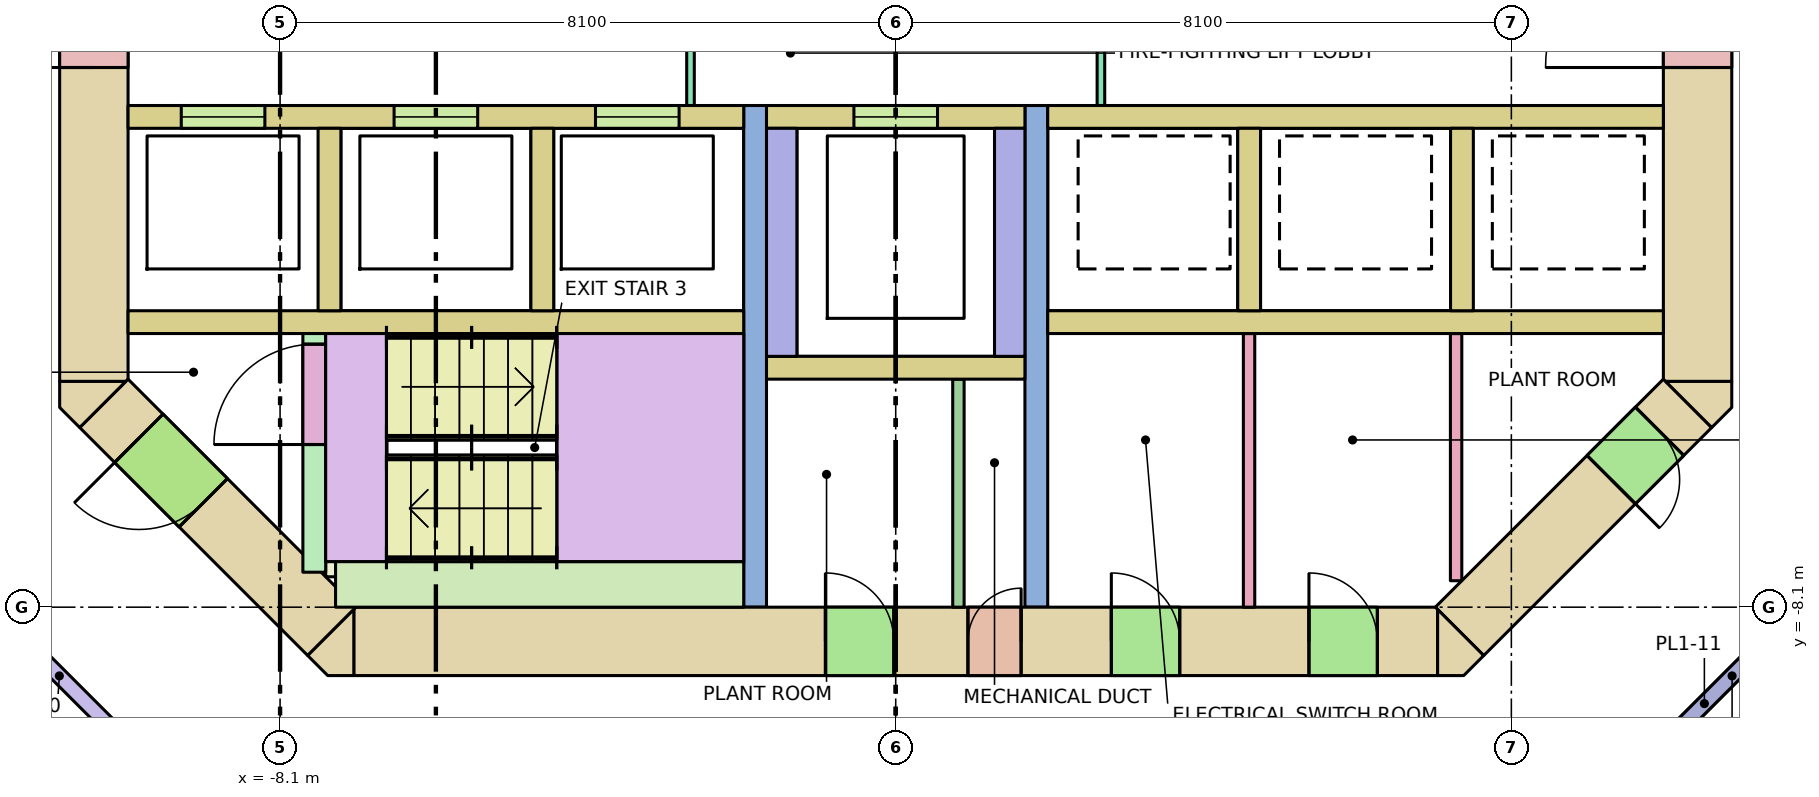
"""IFC4 building model, lengths in metres.
Left out: names, types, materials, properties, quantities, classifications, styles, units other than length and angle.
Written with IfcOpenShell. Run it as: python <this file> out.ifc"""

import sys

from ifc_helpers import new_model, si_unit, direction, frame, frame_2d, origin, place, context, subcontext, project, spatial, polyline, rectangle, outline, extrude, element, fill, save


model = new_model("IFC4")
c1 = context("Model", 3, precision=1e-05, world=origin(), true_north=direction((0.0, 1.0)))
c2 = subcontext(c1, "Body", "Model", "MODEL_VIEW")
j1 = project(units=[si_unit("LENGTHUNIT", "METRE"), si_unit("PLANEANGLEUNIT", "RADIAN")], contexts=[c1])
p1 = place(None, origin())
s1 = spatial("IfcSite", under=j1, at=p1, CompositionType="ELEMENT")
p2 = place(p1, origin())
s2 = spatial("IfcBuilding", under=s1, at=p2, CompositionType="ELEMENT")
p3 = place(p2, frame((0.0, 0.0, 110.6)))
s3 = spatial("IfcBuildingStorey", under=s2, at=p3, CompositionType="ELEMENT", Elevation=110.6)
p4 = place(p3, frame((-7.13, -8.55, -0.28), z_axis=(0.0, 0.0, 1.0), x_axis=(1.0, 0.0, 0.0)))
e1 = element("IfcWall", 1, at=p4, inside=s3, PredefinedType="SHEAR", context=c2, shape_type="SweptSolid", body=[
    extrude(rectangle(XDim=14.26, YDim=0.9, at=frame_2d((7.13, 0.0))), origin(), (0.0, 0.0, 1.0), 5.6),
])
p5 = place(p4, frame((8.08, 0.0, 0.28)))
e2 = element("IfcOpeningElement", 2, at=p5, cuts=e1, PredefinedType="OPENING", context=c2, shape_type="SweptSolid", body=[
    extrude(rectangle(XDim=0.7, YDim=2.1, at=frame_2d((0.35, 1.05))), frame((0.0, 0.46, 0.0), z_axis=(0.0, -1.0, 0.0), x_axis=(1.0, 0.0, 0.0)), (0.0, 0.0, 1.0), 0.92),
])
p6 = place(p4, frame((6.205, 0.0, 0.28)))
e3 = element("IfcOpeningElement", 3, at=p6, cuts=e1, PredefinedType="OPENING", context=c2, shape_type="SweptSolid", body=[
    extrude(rectangle(XDim=0.9, YDim=2.1, at=frame_2d((0.45, 1.05))), frame((0.0, 0.46, 0.0), z_axis=(0.0, -1.0, 0.0), x_axis=(1.0, 0.0, 0.0)), (0.0, 0.0, 1.0), 0.92),
])
p7 = place(p4, frame((9.967, 0.0, 0.28)))
e4 = element("IfcOpeningElement", 4, at=p7, cuts=e1, PredefinedType="OPENING", context=c2, shape_type="SweptSolid", body=[
    extrude(rectangle(XDim=0.9, YDim=2.1, at=frame_2d((0.45, 1.05))), frame((0.0, 0.46, 0.0), z_axis=(0.0, -1.0, 0.0), x_axis=(1.0, 0.0, 0.0)), (0.0, 0.0, 1.0), 0.92),
])
p8 = place(p4, frame((12.567, 0.0, 0.28)))
e5 = element("IfcOpeningElement", 5, at=p8, cuts=e1, PredefinedType="OPENING", context=c2, shape_type="SweptSolid", body=[
    extrude(rectangle(XDim=0.9, YDim=2.1, at=frame_2d((0.45, 1.05))), frame((0.0, 0.46, 0.0), z_axis=(0.0, -1.0, 0.0), x_axis=(1.0, 0.0, 0.0)), (0.0, 0.0, 1.0), 0.92),
])
p9 = place(p3, frame((-10.55, -5.13, -0.28), z_axis=(0.0, 0.0, 1.0), x_axis=(0.0, 1.0, 0.0)))
e6 = element("IfcWall", 6, at=p9, inside=s3, PredefinedType="SHEAR", context=c2, shape_type="SweptSolid", body=[
    extrude(rectangle(XDim=10.26, YDim=0.9, at=frame_2d((5.13, 0.0))), origin(), (0.0, 0.0, 1.0), 5.6),
])
p10 = place(p9, frame((4.13, 0.0, 0.28)))
e7 = element("IfcOpeningElement", 7, at=p10, cuts=e6, PredefinedType="OPENING", context=c2, shape_type="SweptSolid", body=[
    extrude(rectangle(XDim=2.0, YDim=2.1, at=frame_2d((1.0, 1.05))), frame((0.0, 0.46, 0.0), z_axis=(0.0, -1.0, 0.0), x_axis=(1.0, 0.0, 0.0)), (0.0, 0.0, 1.0), 0.92),
])
p11 = place(p3, frame((10.55, -5.13, -0.28), z_axis=(0.0, 0.0, 1.0), x_axis=(0.0, 1.0, 0.0)))
e8 = element("IfcWall", 8, at=p11, inside=s3, PredefinedType="SHEAR", context=c2, shape_type="SweptSolid", body=[
    extrude(rectangle(XDim=10.26, YDim=0.9, at=frame_2d((5.13, 0.0))), origin(), (0.0, 0.0, 1.0), 5.6),
])
p12 = place(p11, frame((4.13, 0.0, 0.28)))
e9 = element("IfcOpeningElement", 9, at=p12, cuts=e8, PredefinedType="OPENING", context=c2, shape_type="SweptSolid", body=[
    extrude(rectangle(XDim=2.0, YDim=2.1, at=frame_2d((1.0, 1.05))), frame((0.0, 0.46, 0.0), z_axis=(0.0, -1.0, 0.0), x_axis=(1.0, 0.0, 0.0)), (0.0, 0.0, 1.0), 0.92),
])
p13 = place(p3, frame((10.418, -5.418, -0.28), z_axis=(0.0, 0.0, 1.0), x_axis=(-0.707106781187, -0.707106781187, 0.0)))
e10 = element("IfcWall", 10, at=p13, inside=s3, PredefinedType="SHEAR", context=c2, shape_type="SweptSolid", body=[
    extrude(rectangle(XDim=4.243, YDim=0.9, at=frame_2d((2.121, 0.0))), origin(), (0.0, 0.0, 1.0), 5.6),
])
p14 = place(p13, frame((0.52, 0.0, 0.28)))
e11 = element("IfcOpeningElement", 11, at=p14, cuts=e10, PredefinedType="OPENING", context=c2, shape_type="SweptSolid", body=[
    extrude(rectangle(XDim=0.9, YDim=2.1, at=frame_2d((0.45, 1.05))), frame((0.0, 0.46, 0.0), z_axis=(0.0, -1.0, 0.0), x_axis=(1.0, 0.0, 0.0)), (0.0, 0.0, 1.0), 0.92),
])
p15 = place(p3, frame((-7.418, -8.418, -0.28), z_axis=(0.0, 0.0, 1.0), x_axis=(-0.707106781187, 0.707106781187, 0.0)))
e12 = element("IfcWall", 12, at=p15, inside=s3, PredefinedType="SHEAR", context=c2, shape_type="SweptSolid", body=[
    extrude(rectangle(XDim=4.243, YDim=0.9, at=frame_2d((2.121, 0.0))), origin(), (0.0, 0.0, 1.0), 5.6),
])
p16 = place(p15, frame((2.393, 0.0, 0.28)))
e13 = element("IfcOpeningElement", 13, at=p16, cuts=e12, PredefinedType="OPENING", context=c2, shape_type="SweptSolid", body=[
    extrude(rectangle(XDim=1.2, YDim=2.1, at=frame_2d((0.6, 1.05))), frame((0.0, 0.46, 0.0), z_axis=(0.0, -1.0, 0.0), x_axis=(1.0, 0.0, 0.0)), (0.0, 0.0, 1.0), 0.92),
])
p17 = place(p3, frame((0.0, 0.0, -0.28)))
e14 = element("IfcWall", 14, at=p17, inside=s3, PredefinedType="SHEAR", context=c2, shape_type="SweptSolid", body=[
    extrude(outline(polyline([(-7.473, -9.0), (-7.736, -8.736), (-7.13, -8.13), (-7.13, -9.0), (-7.473, -9.0)])), origin(), (0.0, 0.0, 1.0), 5.6),
])
p18 = place(p3, frame((0.0, 0.0, -0.28)))
e15 = element("IfcWall", 15, at=p18, inside=s3, PredefinedType="SHEAR", context=c2, shape_type="SweptSolid", body=[
    extrude(outline(polyline([(7.473, -9.0), (7.13, -9.0), (7.13, -8.13), (7.736, -8.736), (7.473, -9.0)])), origin(), (0.0, 0.0, 1.0), 5.6),
])
p19 = place(p3, frame((0.0, 0.0, -0.28)))
e16 = element("IfcWall", 16, at=p19, inside=s3, PredefinedType="SHEAR", context=c2, shape_type="SweptSolid", body=[
    extrude(outline(polyline([(-11.0, -5.473), (-11.0, -5.13), (-10.13, -5.13), (-10.736, -5.736), (-11.0, -5.473)])), origin(), (0.0, 0.0, 1.0), 5.6),
])
p20 = place(p3, frame((0.0, 0.0, -0.28)))
e17 = element("IfcWall", 17, at=p20, inside=s3, PredefinedType="SHEAR", context=c2, shape_type="SweptSolid", body=[
    extrude(outline(polyline([(11.0, -5.473), (10.736, -5.736), (10.13, -5.13), (11.0, -5.13), (11.0, -5.473)])), origin(), (0.0, 0.0, 1.0), 5.6),
])
for number, where, z_axis, x_axis in (
    (18, (-10.1, -4.35, 0.0), (0.0, 0.0, 1.0), (1.0, 0.0, 0.0)),
    (19, (2.0, -4.35, 0.0), (0.0, 0.0, 1.0), (1.0, 0.0, 0.0)),
):
    element("IfcWall", number, at=place(p3, frame(where, z_axis=z_axis, x_axis=x_axis)), inside=s3, PredefinedType="SOLIDWALL", context=c2, shape_type="SweptSolid", body=[
        extrude(rectangle(XDim=8.1, YDim=0.3, at=frame_2d((4.05, 0.0))), origin(), (0.0, 0.0, 1.0), 5.32),
    ])
p21 = place(p3, frame((-10.1, -1.65, 0.0), z_axis=(0.0, 0.0, 1.0), x_axis=(1.0, 0.0, 0.0)))
e20 = element("IfcWall", 20, at=p21, inside=s3, PredefinedType="SOLIDWALL", context=c2, shape_type="SweptSolid", body=[
    extrude(rectangle(XDim=8.1, YDim=0.3, at=frame_2d((4.05, 0.0))), origin(), (0.0, 0.0, 1.0), 5.32),
])
p22 = place(p21, frame((0.7, 0.0, 0.0)))
e21 = element("IfcOpeningElement", 21, at=p22, cuts=e20, PredefinedType="OPENING", context=c2, shape_type="SweptSolid", body=[
    extrude(rectangle(XDim=1.1, YDim=2.1, at=frame_2d((0.55, 1.05))), frame((0.0, 0.16, 0.0), z_axis=(0.0, -1.0, 0.0), x_axis=(1.0, 0.0, 0.0)), (0.0, 0.0, 1.0), 0.32),
])
p23 = place(p21, frame((3.5, 0.0, 0.0)))
e22 = element("IfcOpeningElement", 22, at=p23, cuts=e20, PredefinedType="OPENING", context=c2, shape_type="SweptSolid", body=[
    extrude(rectangle(XDim=1.1, YDim=2.1, at=frame_2d((0.55, 1.05))), frame((0.0, 0.16, 0.0), z_axis=(0.0, -1.0, 0.0), x_axis=(1.0, 0.0, 0.0)), (0.0, 0.0, 1.0), 0.32),
])
p24 = place(p21, frame((6.15, 0.0, 0.0)))
e23 = element("IfcOpeningElement", 23, at=p24, cuts=e20, PredefinedType="OPENING", context=c2, shape_type="SweptSolid", body=[
    extrude(rectangle(XDim=1.1, YDim=2.1, at=frame_2d((0.55, 1.05))), frame((0.0, 0.16, 0.0), z_axis=(0.0, -1.0, 0.0), x_axis=(1.0, 0.0, 0.0)), (0.0, 0.0, 1.0), 0.32),
])
p25 = place(p3, frame((2.0, -1.65, 0.0), z_axis=(0.0, 0.0, 1.0), x_axis=(1.0, 0.0, 0.0)))
e24 = element("IfcWall", 24, at=p25, inside=s3, PredefinedType="SOLIDWALL", context=c2, shape_type="SweptSolid", body=[
    extrude(rectangle(XDim=8.1, YDim=0.3, at=frame_2d((4.05, 0.0))), origin(), (0.0, 0.0, 1.0), 5.32),
])
for number, where, z_axis, x_axis in (
    (25, (-7.45, -4.2, 0.0), (0.0, 0.0, 1.0), (0.0, 1.0, 0.0)),
    (26, (-4.65, -4.2, 0.0), (0.0, 0.0, 1.0), (0.0, 1.0, 0.0)),
    (27, (4.65, -4.2, 0.0), (0.0, 0.0, 1.0), (0.0, 1.0, 0.0)),
    (28, (7.45, -4.2, 0.0), (0.0, 0.0, 1.0), (0.0, 1.0, 0.0)),
):
    element("IfcWall", number, at=place(p3, frame(where, z_axis=z_axis, x_axis=x_axis)), inside=s3, PredefinedType="SOLIDWALL", context=c2, shape_type="SweptSolid", body=[
        extrude(rectangle(XDim=2.4, YDim=0.3, at=frame_2d((1.2, 0.0))), origin(), (0.0, 0.0, 1.0), 5.32),
    ])
for number, where, z_axis, x_axis in (
    (29, (-1.85, -8.1, 0.0), (0.0, 0.0, 1.0), (0.0, 1.0, 0.0)),
    (30, (1.85, -8.1, 0.0), (0.0, 0.0, 1.0), (0.0, 1.0, 0.0)),
):
    element("IfcWall", number, at=place(p3, frame(where, z_axis=z_axis, x_axis=x_axis)), inside=s3, PredefinedType="SHEAR", context=c2, shape_type="SweptSolid", body=[
        extrude(rectangle(XDim=6.6, YDim=0.3, at=frame_2d((3.3, 0.0))), origin(), (0.0, 0.0, 1.0), 5.32),
    ])
p26 = place(p3, frame((-1.7, -1.65, 0.0), z_axis=(0.0, 0.0, 1.0), x_axis=(1.0, 0.0, 0.0)))
e31 = element("IfcWall", 31, at=p26, inside=s3, PredefinedType="SOLIDWALL", context=c2, shape_type="SweptSolid", body=[
    extrude(rectangle(XDim=3.4, YDim=0.3, at=frame_2d((1.7, 0.0))), origin(), (0.0, 0.0, 1.0), 5.32),
])
p27 = place(p26, frame((1.15, 0.0, 0.0)))
e32 = element("IfcOpeningElement", 32, at=p27, cuts=e31, PredefinedType="OPENING", context=c2, shape_type="SweptSolid", body=[
    extrude(rectangle(XDim=1.1, YDim=2.1, at=frame_2d((0.55, 1.05))), frame((0.0, 0.16, 0.0), z_axis=(0.0, -1.0, 0.0), x_axis=(1.0, 0.0, 0.0)), (0.0, 0.0, 1.0), 0.32),
])
for number, where, z_axis, x_axis in (
    (33, (-1.5, -4.8, 0.0), (0.0, 0.0, 1.0), (0.0, 1.0, 0.0)),
    (34, (1.5, -4.8, 0.0), (0.0, 0.0, 1.0), (0.0, 1.0, 0.0)),
):
    element("IfcWall", number, at=place(p3, frame(where, z_axis=z_axis, x_axis=x_axis)), inside=s3, PredefinedType="SOLIDWALL", context=c2, shape_type="SweptSolid", body=[
        extrude(rectangle(XDim=3.0, YDim=0.4, at=frame_2d((1.5, 0.0))), origin(), (0.0, 0.0, 1.0), 5.32),
    ])
p28 = place(p3, frame((-1.7, -4.95, 0.0), z_axis=(0.0, 0.0, 1.0), x_axis=(1.0, 0.0, 0.0)))
e35 = element("IfcWall", 35, at=p28, inside=s3, PredefinedType="SOLIDWALL", context=c2, shape_type="SweptSolid", body=[
    extrude(rectangle(XDim=3.4, YDim=0.3, at=frame_2d((1.7, 0.0))), origin(), (0.0, 0.0, 1.0), 5.32),
])
p29 = place(p3, frame((-7.65, -7.64, 0.0), z_axis=(0.0, 0.0, 1.0), x_axis=(0.0, 1.0, 0.0)))
e36 = element("IfcWall", 36, at=p29, inside=s3, PredefinedType="SHEAR", context=c2, shape_type="SweptSolid", body=[
    extrude(rectangle(XDim=3.14, YDim=0.3, at=frame_2d((1.57, 0.0))), origin(), (0.0, 0.0, 1.0), 5.32),
])
p30 = place(p29, frame((1.68, 0.0, 0.0)))
e37 = element("IfcOpeningElement", 37, at=p30, cuts=e36, PredefinedType="OPENING", context=c2, shape_type="SweptSolid", body=[
    extrude(rectangle(XDim=1.32, YDim=2.1, at=frame_2d((0.66, 1.05))), frame((0.0, 0.16, 0.0), z_axis=(0.0, -1.0, 0.0), x_axis=(1.0, 0.0, 0.0)), (0.0, 0.0, 1.0), 0.32),
])
p31 = place(p3, frame((-7.5, -7.6, 0.0), z_axis=(0.0, 0.0, 1.0), x_axis=(1.0, 0.0, 0.0)))
e38 = element("IfcWall", 38, at=p31, inside=s3, PredefinedType="SHEAR", context=c2, shape_type="SweptSolid", body=[
    extrude(rectangle(XDim=0.6, YDim=0.2, at=frame_2d((0.3, 0.0))), origin(), (0.0, 0.0, 1.0), 5.32),
])
p32 = place(p3, frame((-7.37, -7.8, 0.0), z_axis=(0.0, 0.0, 1.0), x_axis=(1.0, 0.0, 0.0)))
e39 = element("IfcWall", 39, at=p32, inside=s3, PredefinedType="SHEAR", context=c2, shape_type="SweptSolid", body=[
    extrude(rectangle(XDim=5.37, YDim=0.6, at=frame_2d((2.685, 0.0))), origin(), (0.0, 0.0, 1.0), 5.32),
])
p33 = place(p3, frame((-2.7, -1.5, 0.0), z_axis=(0.0, 0.0, 1.0), x_axis=(0.0, 1.0, 0.0)))
e40 = element("IfcWall", 40, at=p33, inside=s3, PredefinedType="PARTITIONING", context=c2, shape_type="SweptSolid", body=[
    extrude(rectangle(XDim=3.0, YDim=0.1, at=frame_2d((1.5, 0.0))), origin(), (0.0, 0.0, 1.0), 5.32),
])
p34 = place(p33, frame((0.9, 0.0, 0.0)))
e41 = element("IfcOpeningElement", 41, at=p34, cuts=e40, PredefinedType="OPENING", context=c2, shape_type="SweptSolid", body=[
    extrude(rectangle(XDim=1.2, YDim=2.1, at=frame_2d((0.6, 1.05))), frame((0.0, 0.06, 0.0), z_axis=(0.0, -1.0, 0.0), x_axis=(1.0, 0.0, 0.0)), (0.0, 0.0, 1.0), 0.12),
])
p35 = place(p3, frame((2.7, -1.5, 0.0), z_axis=(0.0, 0.0, 1.0), x_axis=(0.0, 1.0, 0.0)))
e42 = element("IfcWall", 42, at=p35, inside=s3, PredefinedType="PARTITIONING", context=c2, shape_type="SweptSolid", body=[
    extrude(rectangle(XDim=3.0, YDim=0.1, at=frame_2d((1.5, 0.0))), origin(), (0.0, 0.0, 1.0), 5.32),
])
p36 = place(p35, frame((0.9, 0.0, 0.0)))
e43 = element("IfcOpeningElement", 43, at=p36, cuts=e42, PredefinedType="OPENING", context=c2, shape_type="SweptSolid", body=[
    extrude(rectangle(XDim=1.2, YDim=2.1, at=frame_2d((0.6, 1.05))), frame((0.0, 0.06, 0.0), z_axis=(0.0, -1.0, 0.0), x_axis=(1.0, 0.0, 0.0)), (0.0, 0.0, 1.0), 0.12),
])
p37 = place(p3, frame((0.825, -8.1, 0.0), z_axis=(0.0, 0.0, 1.0), x_axis=(0.0, 1.0, 0.0)))
e44 = element("IfcWall", 44, at=p37, inside=s3, PredefinedType="PARTITIONING", context=c2, shape_type="SweptSolid", body=[
    extrude(rectangle(XDim=3.0, YDim=0.15, at=frame_2d((1.5, 0.0))), origin(), (0.0, 0.0, 1.0), 5.32),
])
p38 = place(p3, frame((4.649, -8.1, 0.0), z_axis=(0.0, 0.0, 1.0), x_axis=(0.0, 1.0, 0.0)))
e45 = element("IfcWall", 45, at=p38, inside=s3, PredefinedType="PARTITIONING", context=c2, shape_type="SweptSolid", body=[
    extrude(rectangle(XDim=3.6, YDim=0.15, at=frame_2d((1.8, 0.0))), origin(), (0.0, 0.0, 1.0), 5.32),
])
p39 = place(p3, frame((7.373, -7.752, 0.0), z_axis=(0.0, 0.0, 1.0), x_axis=(0.0, 1.0, 0.0)))
e46 = element("IfcWall", 46, at=p39, inside=s3, PredefinedType="PARTITIONING", context=c2, shape_type="SweptSolid", body=[
    extrude(rectangle(XDim=3.252, YDim=0.15, at=frame_2d((1.626, 0.0))), origin(), (0.0, 0.0, 1.0), 5.32),
])
p40 = place(p3, frame((13.45, -6.558, 0.0), z_axis=(0.0, 0.0, 1.0), x_axis=(-0.707106781187, -0.707106781187, 0.0)))
e47 = element("IfcWall", 47, at=p40, inside=s3, PredefinedType="PARTITIONING", context=c2, shape_type="SweptSolid", body=[
    extrude(rectangle(XDim=6.919, YDim=0.2, at=frame_2d((3.459, 0.0))), origin(), (0.0, 0.0, 1.0), 4.47),
])
p41 = place(p40, frame((3.075, 0.0, 0.0)))
e48 = element("IfcOpeningElement", 48, at=p41, cuts=e47, PredefinedType="OPENING", context=c2, shape_type="SweptSolid", body=[
    extrude(rectangle(XDim=1.8, YDim=2.1, at=frame_2d((0.9, 1.05))), frame((0.0, 0.11, 0.0), z_axis=(0.0, -1.0, 0.0), x_axis=(1.0, 0.0, 0.0)), (0.0, 0.0, 1.0), 0.22),
])
p42 = place(p3, frame((-8.558, -11.45, 0.0), z_axis=(0.0, 0.0, 1.0), x_axis=(-0.707106781187, 0.707106781187, 0.0)))
e49 = element("IfcWall", 49, at=p42, inside=s3, PredefinedType="PARTITIONING", context=c2, shape_type="SweptSolid", body=[
    extrude(rectangle(XDim=6.919, YDim=0.2, at=frame_2d((3.459, 0.0))), origin(), (0.0, 0.0, 1.0), 4.47),
])
p43 = place(p22, origin())
e50 = element("IfcDoor", 50, at=p43, inside=s3, OperationType="DOUBLE_DOOR_SLIDING", PredefinedType="DOOR", context=c2, shape_type="SweptSolid", body=[
    extrude(rectangle(XDim=1.1, YDim=2.1, at=frame_2d((0.55, 1.05))), frame((0.0, 0.025, 0.0), z_axis=(0.0, -1.0, 0.0), x_axis=(1.0, 0.0, 0.0)), (0.0, 0.0, 1.0), 0.05),
])
fill(e21, e50)
p44 = place(p23, origin())
e51 = element("IfcDoor", 51, at=p44, inside=s3, OperationType="DOUBLE_DOOR_SLIDING", PredefinedType="DOOR", context=c2, shape_type="SweptSolid", body=[
    extrude(rectangle(XDim=1.1, YDim=2.1, at=frame_2d((0.55, 1.05))), frame((0.0, 0.025, 0.0), z_axis=(0.0, -1.0, 0.0), x_axis=(1.0, 0.0, 0.0)), (0.0, 0.0, 1.0), 0.05),
])
fill(e22, e51)
p45 = place(p24, origin())
e52 = element("IfcDoor", 52, at=p45, inside=s3, OperationType="DOUBLE_DOOR_SLIDING", PredefinedType="DOOR", context=c2, shape_type="SweptSolid", body=[
    extrude(rectangle(XDim=1.1, YDim=2.1, at=frame_2d((0.55, 1.05))), frame((0.0, 0.025, 0.0), z_axis=(0.0, -1.0, 0.0), x_axis=(1.0, 0.0, 0.0)), (0.0, 0.0, 1.0), 0.05),
])
fill(e23, e52)
p46 = place(p27, origin())
e53 = element("IfcDoor", 53, at=p46, inside=s3, OperationType="DOUBLE_DOOR_SLIDING", PredefinedType="DOOR", context=c2, shape_type="SweptSolid", body=[
    extrude(rectangle(XDim=1.1, YDim=2.1, at=frame_2d((0.55, 1.05))), frame((0.0, 0.025, 0.0), z_axis=(0.0, -1.0, 0.0), x_axis=(1.0, 0.0, 0.0)), (0.0, 0.0, 1.0), 0.05),
])
fill(e32, e53)
p47 = place(p30, origin())
e54 = element("IfcDoor", 54, at=p47, inside=s3, OperationType="DOUBLE_DOOR_SINGLE_SWING", PredefinedType="DOOR", context=c2, shape_type="SweptSolid", body=[
    extrude(rectangle(XDim=1.32, YDim=2.1, at=frame_2d((0.66, 1.05))), frame((0.0, 0.025, 0.0), z_axis=(0.0, -1.0, 0.0), x_axis=(1.0, 0.0, 0.0)), (0.0, 0.0, 1.0), 0.05),
])
fill(e37, e54)
p48 = place(p16, origin())
e55 = element("IfcDoor", 55, at=p48, inside=s3, OperationType="SINGLE_SWING_RIGHT", PredefinedType="DOOR", context=c2, shape_type="SweptSolid", body=[
    extrude(rectangle(XDim=1.2, YDim=2.1, at=frame_2d((0.6, 1.05))), frame((0.0, 0.025, 0.0), z_axis=(0.0, -1.0, 0.0), x_axis=(1.0, 0.0, 0.0)), (0.0, 0.0, 1.0), 0.05),
])
fill(e13, e55)
p49 = place(p10, origin())
e56 = element("IfcDoor", 56, at=p49, inside=s3, OperationType="DOUBLE_DOOR_SINGLE_SWING", PredefinedType="DOOR", context=c2, shape_type="SweptSolid", body=[
    extrude(rectangle(XDim=2.0, YDim=2.1, at=frame_2d((1.0, 1.05))), frame((0.0, 0.025, 0.0), z_axis=(0.0, -1.0, 0.0), x_axis=(1.0, 0.0, 0.0)), (0.0, 0.0, 1.0), 0.05),
])
fill(e7, e56)
p50 = place(p12, origin())
e57 = element("IfcDoor", 57, at=p50, inside=s3, OperationType="DOUBLE_DOOR_SINGLE_SWING", PredefinedType="DOOR", context=c2, shape_type="SweptSolid", body=[
    extrude(rectangle(XDim=2.0, YDim=2.1, at=frame_2d((1.0, 1.05))), frame((0.0, 0.025, 0.0), z_axis=(0.0, -1.0, 0.0), x_axis=(1.0, 0.0, 0.0)), (0.0, 0.0, 1.0), 0.05),
])
fill(e9, e57)
p51 = place(p5, origin())
e58 = element("IfcDoor", 58, at=p51, inside=s3, OperationType="SINGLE_SWING_RIGHT", PredefinedType="DOOR", context=c2, shape_type="SweptSolid", body=[
    extrude(rectangle(XDim=0.7, YDim=2.1, at=frame_2d((0.35, 1.05))), frame((0.0, 0.025, 0.0), z_axis=(0.0, -1.0, 0.0), x_axis=(1.0, 0.0, 0.0)), (0.0, 0.0, 1.0), 0.05),
])
fill(e2, e58)
p52 = place(p6, origin())
e59 = element("IfcDoor", 59, at=p52, inside=s3, OperationType="SINGLE_SWING_LEFT", PredefinedType="DOOR", context=c2, shape_type="SweptSolid", body=[
    extrude(rectangle(XDim=0.9, YDim=2.1, at=frame_2d((0.45, 1.05))), frame((0.0, 0.025, 0.0), z_axis=(0.0, -1.0, 0.0), x_axis=(1.0, 0.0, 0.0)), (0.0, 0.0, 1.0), 0.05),
])
fill(e3, e59)
p53 = place(p7, origin())
e60 = element("IfcDoor", 60, at=p53, inside=s3, OperationType="SINGLE_SWING_LEFT", PredefinedType="DOOR", context=c2, shape_type="SweptSolid", body=[
    extrude(rectangle(XDim=0.9, YDim=2.1, at=frame_2d((0.45, 1.05))), frame((0.0, 0.025, 0.0), z_axis=(0.0, -1.0, 0.0), x_axis=(1.0, 0.0, 0.0)), (0.0, 0.0, 1.0), 0.05),
])
fill(e4, e60)
p54 = place(p8, origin())
e61 = element("IfcDoor", 61, at=p54, inside=s3, OperationType="SINGLE_SWING_LEFT", PredefinedType="DOOR", context=c2, shape_type="SweptSolid", body=[
    extrude(rectangle(XDim=0.9, YDim=2.1, at=frame_2d((0.45, 1.05))), frame((0.0, 0.025, 0.0), z_axis=(0.0, -1.0, 0.0), x_axis=(1.0, 0.0, 0.0)), (0.0, 0.0, 1.0), 0.05),
])
fill(e5, e61)
p55 = place(p14, origin())
e62 = element("IfcDoor", 62, at=p55, inside=s3, OperationType="SINGLE_SWING_RIGHT", PredefinedType="DOOR", context=c2, shape_type="SweptSolid", body=[
    extrude(rectangle(XDim=0.9, YDim=2.1, at=frame_2d((0.45, 1.05))), frame((0.0, 0.025, 0.0), z_axis=(0.0, -1.0, 0.0), x_axis=(1.0, 0.0, 0.0)), (0.0, 0.0, 1.0), 0.05),
])
fill(e11, e62)
p56 = place(p41, origin())
e63 = element("IfcDoor", 63, at=p56, inside=s3, OperationType="DOUBLE_DOOR_SINGLE_SWING", PredefinedType="DOOR", context=c2, shape_type="SweptSolid", body=[
    extrude(rectangle(XDim=1.8, YDim=2.1, at=frame_2d((0.9, 1.05))), frame((0.0, 0.025, 0.0), z_axis=(0.0, -1.0, 0.0), x_axis=(1.0, 0.0, 0.0)), (0.0, 0.0, 1.0), 0.05),
])
fill(e48, e63)
save(model, sys.argv[1])
